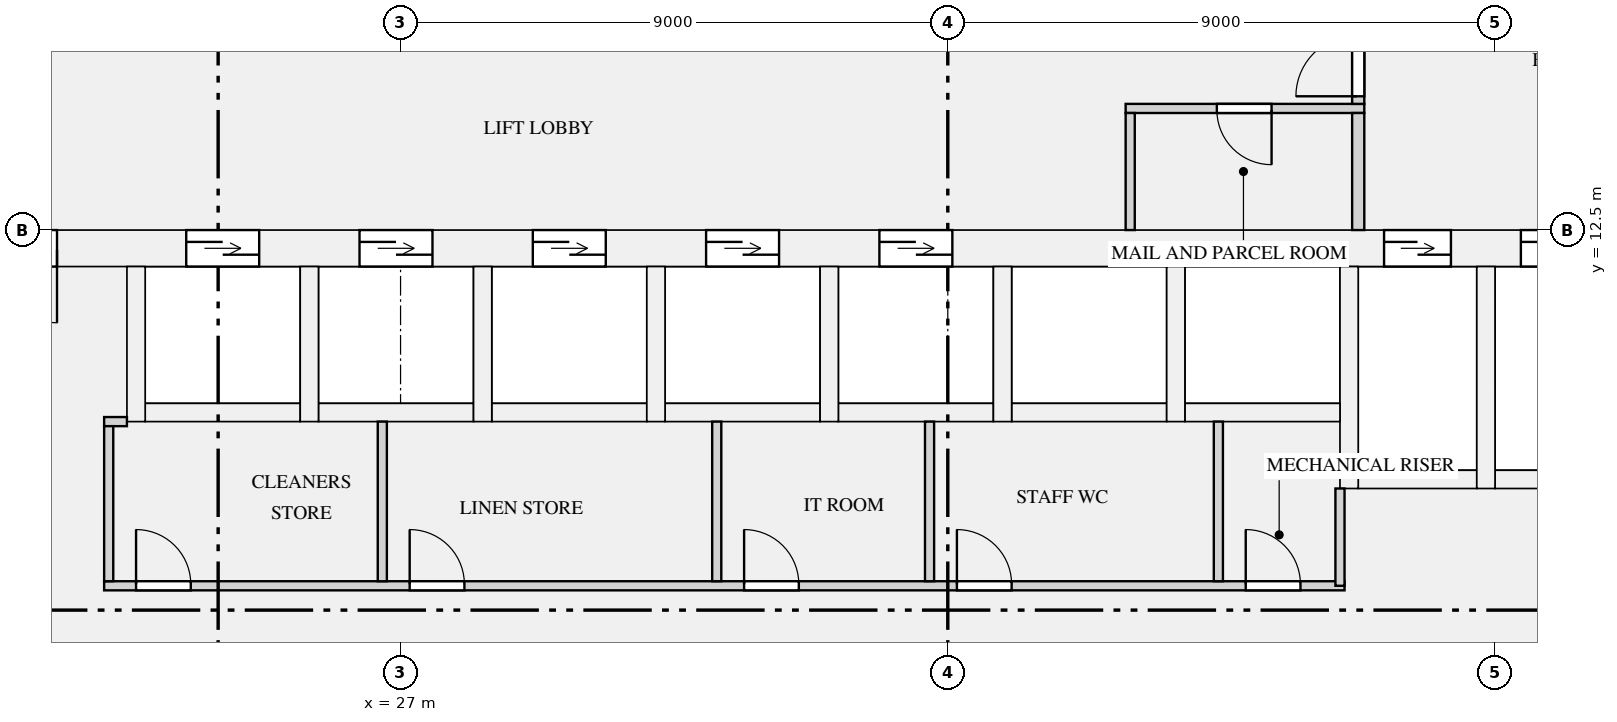
"""IFC4 building model, lengths in metres.
Left out: names, types, materials, properties, quantities, classifications, styles, units other than length and angle.
Written with IfcOpenShell. Run it as: python <this file> out.ifc"""

import sys

from ifc_helpers import new_model, si_unit, direction, frame, frame_2d, origin, place, context, subcontext, project, spatial, rectangle, extrude, element, fill, save


model = new_model("IFC4")
c1 = context("Model", 3, precision=1e-05, world=origin(), true_north=direction((0.0, 1.0)))
c2 = subcontext(c1, "Body", "Model", "MODEL_VIEW")
j1 = project(units=[si_unit("LENGTHUNIT", "METRE"), si_unit("PLANEANGLEUNIT", "RADIAN")], contexts=[c1])
p1 = place(None, origin())
s1 = spatial("IfcSite", under=j1, at=p1, CompositionType="ELEMENT")
p2 = place(p1, origin())
s2 = spatial("IfcBuilding", under=s1, at=p2, CompositionType="ELEMENT")
p3 = place(p2, frame((0.0, 0.0, 47.85)))
s3 = spatial("IfcBuildingStorey", under=s2, at=p3, CompositionType="ELEMENT", Elevation=47.85)
p4 = place(p3, frame((19.0, 12.2, 0.0), z_axis=(0.0, 0.0, 1.0), x_axis=(1.0, 0.0, 0.0)))
e1 = element("IfcWall", 1, at=p4, inside=s3, PredefinedType="SHEAR", context=c2, shape_type="SweptSolid", body=[
    extrude(rectangle(XDim=34.0, YDim=0.6, at=frame_2d((17.0, 0.0))), origin(), (0.0, 0.0, 1.0), 3.15),
])
p5 = place(p4, frame((4.475, 0.0, 0.0)))
e2 = element("IfcOpeningElement", 2, at=p5, cuts=e1, PredefinedType="OPENING", context=c2, shape_type="SweptSolid", body=[
    extrude(rectangle(XDim=1.2, YDim=2.1, at=frame_2d((0.6, 1.05))), frame((0.0, 0.31, 0.0), z_axis=(0.0, -1.0, 0.0), x_axis=(1.0, 0.0, 0.0)), (0.0, 0.0, 1.0), 0.62),
])
p6 = place(p4, frame((7.325, 0.0, 0.0)))
e3 = element("IfcOpeningElement", 3, at=p6, cuts=e1, PredefinedType="OPENING", context=c2, shape_type="SweptSolid", body=[
    extrude(rectangle(XDim=1.2, YDim=2.1, at=frame_2d((0.6, 1.05))), frame((0.0, 0.31, 0.0), z_axis=(0.0, -1.0, 0.0), x_axis=(1.0, 0.0, 0.0)), (0.0, 0.0, 1.0), 0.62),
])
p7 = place(p4, frame((10.175, 0.0, 0.0)))
e4 = element("IfcOpeningElement", 4, at=p7, cuts=e1, PredefinedType="OPENING", context=c2, shape_type="SweptSolid", body=[
    extrude(rectangle(XDim=1.2, YDim=2.1, at=frame_2d((0.6, 1.05))), frame((0.0, 0.31, 0.0), z_axis=(0.0, -1.0, 0.0), x_axis=(1.0, 0.0, 0.0)), (0.0, 0.0, 1.0), 0.62),
])
p8 = place(p4, frame((13.025, 0.0, 0.0)))
e5 = element("IfcOpeningElement", 5, at=p8, cuts=e1, PredefinedType="OPENING", context=c2, shape_type="SweptSolid", body=[
    extrude(rectangle(XDim=1.2, YDim=2.1, at=frame_2d((0.6, 1.05))), frame((0.0, 0.31, 0.0), z_axis=(0.0, -1.0, 0.0), x_axis=(1.0, 0.0, 0.0)), (0.0, 0.0, 1.0), 0.62),
])
p9 = place(p4, frame((15.875, 0.0, 0.0)))
e6 = element("IfcOpeningElement", 6, at=p9, cuts=e1, PredefinedType="OPENING", context=c2, shape_type="SweptSolid", body=[
    extrude(rectangle(XDim=1.2, YDim=2.1, at=frame_2d((0.6, 1.05))), frame((0.0, 0.31, 0.0), z_axis=(0.0, -1.0, 0.0), x_axis=(1.0, 0.0, 0.0)), (0.0, 0.0, 1.0), 0.62),
])
p10 = place(p4, frame((24.175, 0.0, 0.0)))
e7 = element("IfcOpeningElement", 7, at=p10, cuts=e1, PredefinedType="OPENING", context=c2, shape_type="SweptSolid", body=[
    extrude(rectangle(XDim=1.1, YDim=2.1, at=frame_2d((0.55, 1.05))), frame((0.0, 0.31, 0.0), z_axis=(0.0, -1.0, 0.0), x_axis=(1.0, 0.0, 0.0)), (0.0, 0.0, 1.0), 0.62),
])
p11 = place(p4, frame((26.425, 0.0, 0.0)))
e8 = element("IfcOpeningElement", 8, at=p11, cuts=e1, PredefinedType="OPENING", context=c2, shape_type="SweptSolid", body=[
    extrude(rectangle(XDim=1.1, YDim=2.1, at=frame_2d((0.55, 1.05))), frame((0.0, 0.31, 0.0), z_axis=(0.0, -1.0, 0.0), x_axis=(1.0, 0.0, 0.0)), (0.0, 0.0, 1.0), 0.62),
])
p12 = place(p4, frame((28.675, 0.0, 0.0)))
e9 = element("IfcOpeningElement", 9, at=p12, cuts=e1, PredefinedType="OPENING", context=c2, shape_type="SweptSolid", body=[
    extrude(rectangle(XDim=1.1, YDim=2.1, at=frame_2d((0.55, 1.05))), frame((0.0, 0.31, 0.0), z_axis=(0.0, -1.0, 0.0), x_axis=(1.0, 0.0, 0.0)), (0.0, 0.0, 1.0), 0.62),
])
p13 = place(p4, frame((1.15, 0.0, 0.0)))
e10 = element("IfcOpeningElement", 10, at=p13, cuts=e1, PredefinedType="OPENING", context=c2, shape_type="SweptSolid", body=[
    extrude(rectangle(XDim=1.2, YDim=2.1, at=frame_2d((0.6, 1.05))), frame((0.0, 0.31, 0.0), z_axis=(0.0, -1.0, 0.0), x_axis=(1.0, 0.0, 0.0)), (0.0, 0.0, 1.0), 0.62),
])
p14 = place(p4, frame((31.65, 0.0, 0.0)))
e11 = element("IfcOpeningElement", 11, at=p14, cuts=e1, PredefinedType="OPENING", context=c2, shape_type="SweptSolid", body=[
    extrude(rectangle(XDim=1.2, YDim=2.1, at=frame_2d((0.6, 1.05))), frame((0.0, 0.31, 0.0), z_axis=(0.0, -1.0, 0.0), x_axis=(1.0, 0.0, 0.0)), (0.0, 0.0, 1.0), 0.62),
])
p15 = place(p3, frame((22.8, 9.5, 0.0), z_axis=(0.0, 0.0, 1.0), x_axis=(1.0, 0.0, 0.0)))
e12 = element("IfcWall", 12, at=p15, inside=s3, PredefinedType="SHEAR", context=c2, shape_type="SweptSolid", body=[
    extrude(rectangle(XDim=2.55, YDim=0.3, at=frame_2d((1.275, 0.0))), origin(), (0.0, 0.0, 1.0), 3.15),
])
p16 = place(p3, frame((22.65, 9.35, 0.0), z_axis=(0.0, 0.0, 1.0), x_axis=(0.0, 1.0, 0.0)))
e13 = element("IfcWall", 13, at=p16, inside=s3, PredefinedType="SHEAR", context=c2, shape_type="SweptSolid", body=[
    extrude(rectangle(XDim=2.55, YDim=0.3, at=frame_2d((1.275, 0.0))), origin(), (0.0, 0.0, 1.0), 3.15),
])
p17 = place(p3, frame((25.65, 9.5, 0.0), z_axis=(0.0, 0.0, 1.0), x_axis=(1.0, 0.0, 0.0)))
e14 = element("IfcWall", 14, at=p17, inside=s3, PredefinedType="SHEAR", context=c2, shape_type="SweptSolid", body=[
    extrude(rectangle(XDim=2.55, YDim=0.3, at=frame_2d((1.275, 0.0))), origin(), (0.0, 0.0, 1.0), 3.15),
])
p18 = place(p3, frame((25.5, 9.35, 0.0), z_axis=(0.0, 0.0, 1.0), x_axis=(0.0, 1.0, 0.0)))
e15 = element("IfcWall", 15, at=p18, inside=s3, PredefinedType="SHEAR", context=c2, shape_type="SweptSolid", body=[
    extrude(rectangle(XDim=2.55, YDim=0.3, at=frame_2d((1.275, 0.0))), origin(), (0.0, 0.0, 1.0), 3.15),
])
p19 = place(p3, frame((28.5, 9.5, 0.0), z_axis=(0.0, 0.0, 1.0), x_axis=(1.0, 0.0, 0.0)))
e16 = element("IfcWall", 16, at=p19, inside=s3, PredefinedType="SHEAR", context=c2, shape_type="SweptSolid", body=[
    extrude(rectangle(XDim=2.55, YDim=0.3, at=frame_2d((1.275, 0.0))), origin(), (0.0, 0.0, 1.0), 3.15),
])
for number, where, z_axis, x_axis in (
    (17, (28.35, 9.35, 0.0), (0.0, 0.0, 1.0), (0.0, 1.0, 0.0)),
    (18, (31.35, 9.5, 0.0), (0.0, 0.0, 1.0), (1.0, 0.0, 0.0)),
    (19, (31.2, 9.35, 0.0), (0.0, 0.0, 1.0), (0.0, 1.0, 0.0)),
):
    element("IfcWall", number, at=place(p3, frame(where, z_axis=z_axis, x_axis=x_axis)), inside=s3, PredefinedType="SHEAR", context=c2, shape_type="SweptSolid", body=[
        extrude(rectangle(XDim=2.55, YDim=0.3, at=frame_2d((1.275, 0.0))), origin(), (0.0, 0.0, 1.0), 3.15),
    ])
p20 = place(p3, frame((34.2, 9.5, 0.0), z_axis=(0.0, 0.0, 1.0), x_axis=(1.0, 0.0, 0.0)))
e20 = element("IfcWall", 20, at=p20, inside=s3, PredefinedType="SHEAR", context=c2, shape_type="SweptSolid", body=[
    extrude(rectangle(XDim=2.55, YDim=0.3, at=frame_2d((1.275, 0.0))), origin(), (0.0, 0.0, 1.0), 3.15),
])
p21 = place(p3, frame((34.05, 9.35, 0.0), z_axis=(0.0, 0.0, 1.0), x_axis=(0.0, 1.0, 0.0)))
e21 = element("IfcWall", 21, at=p21, inside=s3, PredefinedType="SHEAR", context=c2, shape_type="SweptSolid", body=[
    extrude(rectangle(XDim=2.55, YDim=0.3, at=frame_2d((1.275, 0.0))), origin(), (0.0, 0.0, 1.0), 3.15),
])
p22 = place(p3, frame((37.05, 9.5, 0.0), z_axis=(0.0, 0.0, 1.0), x_axis=(1.0, 0.0, 0.0)))
e22 = element("IfcWall", 22, at=p22, inside=s3, PredefinedType="SHEAR", context=c2, shape_type="SweptSolid", body=[
    extrude(rectangle(XDim=2.55, YDim=0.3, at=frame_2d((1.275, 0.0))), origin(), (0.0, 0.0, 1.0), 3.15),
])
p23 = place(p3, frame((36.9, 9.35, 0.0), z_axis=(0.0, 0.0, 1.0), x_axis=(0.0, 1.0, 0.0)))
e23 = element("IfcWall", 23, at=p23, inside=s3, PredefinedType="SHEAR", context=c2, shape_type="SweptSolid", body=[
    extrude(rectangle(XDim=2.55, YDim=0.3, at=frame_2d((1.275, 0.0))), origin(), (0.0, 0.0, 1.0), 3.15),
])
p24 = place(p3, frame((39.9, 9.5, 0.0), z_axis=(0.0, 0.0, 1.0), x_axis=(1.0, 0.0, 0.0)))
e24 = element("IfcWall", 24, at=p24, inside=s3, PredefinedType="SHEAR", context=c2, shape_type="SweptSolid", body=[
    extrude(rectangle(XDim=2.55, YDim=0.3, at=frame_2d((1.275, 0.0))), origin(), (0.0, 0.0, 1.0), 3.15),
])
p25 = place(p3, frame((39.75, 9.35, 0.0), z_axis=(0.0, 0.0, 1.0), x_axis=(0.0, 1.0, 0.0)))
e25 = element("IfcWall", 25, at=p25, inside=s3, PredefinedType="SHEAR", context=c2, shape_type="SweptSolid", body=[
    extrude(rectangle(XDim=2.55, YDim=0.3, at=frame_2d((1.275, 0.0))), origin(), (0.0, 0.0, 1.0), 3.15),
])
p26 = place(p3, frame((42.75, 8.4, 0.0), z_axis=(0.0, 0.0, 1.0), x_axis=(1.0, 0.0, 0.0)))
e26 = element("IfcWall", 26, at=p26, inside=s3, PredefinedType="SHEAR", context=c2, shape_type="SweptSolid", body=[
    extrude(rectangle(XDim=1.95, YDim=0.3, at=frame_2d((0.975, 0.0))), origin(), (0.0, 0.0, 1.0), 3.15),
])
p27 = place(p3, frame((42.6, 8.25, 0.0), z_axis=(0.0, 0.0, 1.0), x_axis=(0.0, 1.0, 0.0)))
e27 = element("IfcWall", 27, at=p27, inside=s3, PredefinedType="SHEAR", context=c2, shape_type="SweptSolid", body=[
    extrude(rectangle(XDim=3.65, YDim=0.3, at=frame_2d((1.825, 0.0))), origin(), (0.0, 0.0, 1.0), 3.15),
])
p28 = place(p3, frame((45.0, 8.4, 0.0), z_axis=(0.0, 0.0, 1.0), x_axis=(1.0, 0.0, 0.0)))
e28 = element("IfcWall", 28, at=p28, inside=s3, PredefinedType="SHEAR", context=c2, shape_type="SweptSolid", body=[
    extrude(rectangle(XDim=1.95, YDim=0.3, at=frame_2d((0.975, 0.0))), origin(), (0.0, 0.0, 1.0), 3.15),
])
p29 = place(p3, frame((44.85, 8.25, 0.0), z_axis=(0.0, 0.0, 1.0), x_axis=(0.0, 1.0, 0.0)))
e29 = element("IfcWall", 29, at=p29, inside=s3, PredefinedType="SHEAR", context=c2, shape_type="SweptSolid", body=[
    extrude(rectangle(XDim=3.65, YDim=0.3, at=frame_2d((1.825, 0.0))), origin(), (0.0, 0.0, 1.0), 3.15),
])
p30 = place(p3, frame((22.125, 6.65, 0.0), z_axis=(0.0, 0.0, 1.0), x_axis=(1.0, 0.0, 0.0)))
e30 = element("IfcWall", 30, at=p30, inside=s3, PredefinedType="PARTITIONING", context=c2, shape_type="SweptSolid", body=[
    extrude(rectangle(XDim=20.4, YDim=0.15, at=frame_2d((10.2, 0.0))), origin(), (0.0, 0.0, 1.0), 2.83),
])
p31 = place(p30, frame((0.525, 0.0, 0.0)))
e31 = element("IfcOpeningElement", 31, at=p31, cuts=e30, PredefinedType="OPENING", context=c2, shape_type="SweptSolid", body=[
    extrude(rectangle(XDim=0.9, YDim=2.1, at=frame_2d((0.45, 1.05))), frame((0.0, 0.085, 0.0), z_axis=(0.0, -1.0, 0.0), x_axis=(1.0, 0.0, 0.0)), (0.0, 0.0, 1.0), 0.17),
])
p32 = place(p30, frame((5.025, 0.0, 0.0)))
e32 = element("IfcOpeningElement", 32, at=p32, cuts=e30, PredefinedType="OPENING", context=c2, shape_type="SweptSolid", body=[
    extrude(rectangle(XDim=0.9, YDim=2.1, at=frame_2d((0.45, 1.05))), frame((0.0, 0.085, 0.0), z_axis=(0.0, -1.0, 0.0), x_axis=(1.0, 0.0, 0.0)), (0.0, 0.0, 1.0), 0.17),
])
p33 = place(p30, frame((10.525, 0.0, 0.0)))
e33 = element("IfcOpeningElement", 33, at=p33, cuts=e30, PredefinedType="OPENING", context=c2, shape_type="SweptSolid", body=[
    extrude(rectangle(XDim=0.9, YDim=2.1, at=frame_2d((0.45, 1.05))), frame((0.0, 0.085, 0.0), z_axis=(0.0, -1.0, 0.0), x_axis=(1.0, 0.0, 0.0)), (0.0, 0.0, 1.0), 0.17),
])
p34 = place(p30, frame((14.025, 0.0, 0.0)))
e34 = element("IfcOpeningElement", 34, at=p34, cuts=e30, PredefinedType="OPENING", context=c2, shape_type="SweptSolid", body=[
    extrude(rectangle(XDim=0.9, YDim=2.1, at=frame_2d((0.45, 1.05))), frame((0.0, 0.085, 0.0), z_axis=(0.0, -1.0, 0.0), x_axis=(1.0, 0.0, 0.0)), (0.0, 0.0, 1.0), 0.17),
])
p35 = place(p30, frame((18.775, 0.0, 0.0)))
e35 = element("IfcOpeningElement", 35, at=p35, cuts=e30, PredefinedType="OPENING", context=c2, shape_type="SweptSolid", body=[
    extrude(rectangle(XDim=0.9, YDim=2.1, at=frame_2d((0.45, 1.05))), frame((0.0, 0.085, 0.0), z_axis=(0.0, -1.0, 0.0), x_axis=(1.0, 0.0, 0.0)), (0.0, 0.0, 1.0), 0.17),
])
p36 = place(p3, frame((22.125, 9.35, 0.0), z_axis=(0.0, 0.0, 1.0), x_axis=(1.0, 0.0, 0.0)))
e36 = element("IfcWall", 36, at=p36, inside=s3, PredefinedType="PARTITIONING", context=c2, shape_type="SweptSolid", body=[
    extrude(rectangle(XDim=0.375, YDim=0.15, at=frame_2d((0.188, 0.0))), origin(), (0.0, 0.0, 1.0), 2.83),
])
p37 = place(p3, frame((38.925, 14.5, 0.0), z_axis=(0.0, 0.0, 1.0), x_axis=(1.0, 0.0, 0.0)))
e37 = element("IfcWall", 37, at=p37, inside=s3, PredefinedType="PARTITIONING", context=c2, shape_type="SweptSolid", body=[
    extrude(rectangle(XDim=3.925, YDim=0.15, at=frame_2d((1.962, 0.0))), origin(), (0.0, 0.0, 1.0), 2.83),
])
p38 = place(p37, frame((1.5, 0.0, 0.0)))
e38 = element("IfcOpeningElement", 38, at=p38, cuts=e37, PredefinedType="OPENING", context=c2, shape_type="SweptSolid", body=[
    extrude(rectangle(XDim=0.9, YDim=2.1, at=frame_2d((0.45, 1.05))), frame((0.0, 0.085, 0.0), z_axis=(0.0, -1.0, 0.0), x_axis=(1.0, 0.0, 0.0)), (0.0, 0.0, 1.0), 0.17),
])
p39 = place(p3, frame((42.45, 6.65, 0.0), z_axis=(0.0, 0.0, 1.0), x_axis=(0.0, 1.0, 0.0)))
e39 = element("IfcWall", 39, at=p39, inside=s3, PredefinedType="PARTITIONING", context=c2, shape_type="SweptSolid", body=[
    extrude(rectangle(XDim=1.6, YDim=0.15, at=frame_2d((0.8, 0.0))), origin(), (0.0, 0.0, 1.0), 2.83),
])
p40 = place(p3, frame((22.2, 6.725, 0.0), z_axis=(0.0, 0.0, 1.0), x_axis=(0.0, 1.0, 0.0)))
e40 = element("IfcWall", 40, at=p40, inside=s3, PredefinedType="PARTITIONING", context=c2, shape_type="SweptSolid", body=[
    extrude(rectangle(XDim=2.55, YDim=0.15, at=frame_2d((1.275, 0.0))), origin(), (0.0, 0.0, 1.0), 2.83),
])
for number, where, z_axis, x_axis in (
    (41, (26.7, 6.725, 0.0), (0.0, 0.0, 1.0), (0.0, 1.0, 0.0)),
    (42, (32.2, 6.725, 0.0), (0.0, 0.0, 1.0), (0.0, 1.0, 0.0)),
    (43, (35.7, 6.725, 0.0), (0.0, 0.0, 1.0), (0.0, 1.0, 0.0)),
    (44, (40.45, 6.725, 0.0), (0.0, 0.0, 1.0), (0.0, 1.0, 0.0)),
):
    element("IfcWall", number, at=place(p3, frame(where, z_axis=z_axis, x_axis=x_axis)), inside=s3, PredefinedType="PARTITIONING", context=c2, shape_type="SweptSolid", body=[
        extrude(rectangle(XDim=2.625, YDim=0.15, at=frame_2d((1.312, 0.0))), origin(), (0.0, 0.0, 1.0), 2.83),
    ])
p41 = place(p3, frame((39.0, 12.5, 0.0), z_axis=(0.0, 0.0, 1.0), x_axis=(0.0, 1.0, 0.0)))
e45 = element("IfcWall", 45, at=p41, inside=s3, PredefinedType="PARTITIONING", context=c2, shape_type="SweptSolid", body=[
    extrude(rectangle(XDim=1.925, YDim=0.15, at=frame_2d((0.962, 0.0))), origin(), (0.0, 0.0, 1.0), 2.83),
])
p42 = place(p3, frame((42.75, 12.5, 0.0), z_axis=(0.0, 0.0, 1.0), x_axis=(0.0, 1.0, 0.0)))
e46 = element("IfcWall", 46, at=p42, inside=s3, PredefinedType="PARTITIONING", context=c2, shape_type="SweptSolid", body=[
    extrude(rectangle(XDim=1.925, YDim=0.2, at=frame_2d((0.962, 0.0))), origin(), (0.0, 0.0, 1.0), 2.83),
])
p43 = place(p3, frame((42.75, 14.575, 0.0), z_axis=(0.0, 0.0, 1.0), x_axis=(0.0, 1.0, 0.0)))
e47 = element("IfcWall", 47, at=p43, inside=s3, PredefinedType="PARTITIONING", context=c2, shape_type="SweptSolid", body=[
    extrude(rectangle(XDim=1.325, YDim=0.2, at=frame_2d((0.663, 0.0))), origin(), (0.0, 0.0, 1.0), 2.83),
])
p44 = place(p43, frame((0.125, 0.0, 0.0)))
e48 = element("IfcOpeningElement", 48, at=p44, cuts=e47, PredefinedType="OPENING", context=c2, shape_type="SweptSolid", body=[
    extrude(rectangle(XDim=1.0, YDim=2.1, at=frame_2d((0.5, 1.05))), frame((0.0, 0.11, 0.0), z_axis=(0.0, -1.0, 0.0), x_axis=(1.0, 0.0, 0.0)), (0.0, 0.0, 1.0), 0.22),
])
p45 = place(p5, origin())
e49 = element("IfcDoor", 49, at=p45, inside=s3, OperationType="DOUBLE_DOOR_SLIDING", PredefinedType="DOOR", context=c2, shape_type="SweptSolid", body=[
    extrude(rectangle(XDim=1.2, YDim=2.1, at=frame_2d((0.6, 1.05))), frame((0.0, 0.025, 0.0), z_axis=(0.0, -1.0, 0.0), x_axis=(1.0, 0.0, 0.0)), (0.0, 0.0, 1.0), 0.05),
])
fill(e2, e49)
p46 = place(p6, origin())
e50 = element("IfcDoor", 50, at=p46, inside=s3, OperationType="DOUBLE_DOOR_SLIDING", PredefinedType="DOOR", context=c2, shape_type="SweptSolid", body=[
    extrude(rectangle(XDim=1.2, YDim=2.1, at=frame_2d((0.6, 1.05))), frame((0.0, 0.025, 0.0), z_axis=(0.0, -1.0, 0.0), x_axis=(1.0, 0.0, 0.0)), (0.0, 0.0, 1.0), 0.05),
])
fill(e3, e50)
p47 = place(p7, origin())
e51 = element("IfcDoor", 51, at=p47, inside=s3, OperationType="DOUBLE_DOOR_SLIDING", PredefinedType="DOOR", context=c2, shape_type="SweptSolid", body=[
    extrude(rectangle(XDim=1.2, YDim=2.1, at=frame_2d((0.6, 1.05))), frame((0.0, 0.025, 0.0), z_axis=(0.0, -1.0, 0.0), x_axis=(1.0, 0.0, 0.0)), (0.0, 0.0, 1.0), 0.05),
])
fill(e4, e51)
p48 = place(p8, origin())
e52 = element("IfcDoor", 52, at=p48, inside=s3, OperationType="DOUBLE_DOOR_SLIDING", PredefinedType="DOOR", context=c2, shape_type="SweptSolid", body=[
    extrude(rectangle(XDim=1.2, YDim=2.1, at=frame_2d((0.6, 1.05))), frame((0.0, 0.025, 0.0), z_axis=(0.0, -1.0, 0.0), x_axis=(1.0, 0.0, 0.0)), (0.0, 0.0, 1.0), 0.05),
])
fill(e5, e52)
p49 = place(p9, origin())
e53 = element("IfcDoor", 53, at=p49, inside=s3, OperationType="DOUBLE_DOOR_SLIDING", PredefinedType="DOOR", context=c2, shape_type="SweptSolid", body=[
    extrude(rectangle(XDim=1.2, YDim=2.1, at=frame_2d((0.6, 1.05))), frame((0.0, 0.025, 0.0), z_axis=(0.0, -1.0, 0.0), x_axis=(1.0, 0.0, 0.0)), (0.0, 0.0, 1.0), 0.05),
])
fill(e6, e53)
p50 = place(p10, origin())
e54 = element("IfcDoor", 54, at=p50, inside=s3, OperationType="DOUBLE_DOOR_SLIDING", PredefinedType="DOOR", context=c2, shape_type="SweptSolid", body=[
    extrude(rectangle(XDim=1.1, YDim=2.1, at=frame_2d((0.55, 1.05))), frame((0.0, 0.025, 0.0), z_axis=(0.0, -1.0, 0.0), x_axis=(1.0, 0.0, 0.0)), (0.0, 0.0, 1.0), 0.05),
])
fill(e7, e54)
p51 = place(p11, origin())
e55 = element("IfcDoor", 55, at=p51, inside=s3, OperationType="DOUBLE_DOOR_SLIDING", PredefinedType="DOOR", context=c2, shape_type="SweptSolid", body=[
    extrude(rectangle(XDim=1.1, YDim=2.1, at=frame_2d((0.55, 1.05))), frame((0.0, 0.025, 0.0), z_axis=(0.0, -1.0, 0.0), x_axis=(1.0, 0.0, 0.0)), (0.0, 0.0, 1.0), 0.05),
])
fill(e8, e55)
p52 = place(p31, origin())
e56 = element("IfcDoor", 56, at=p52, inside=s3, OperationType="SINGLE_SWING_LEFT", PredefinedType="DOOR", context=c2, shape_type="SweptSolid", body=[
    extrude(rectangle(XDim=0.9, YDim=2.1, at=frame_2d((0.45, 1.05))), frame((0.0, 0.025, 0.0), z_axis=(0.0, -1.0, 0.0), x_axis=(1.0, 0.0, 0.0)), (0.0, 0.0, 1.0), 0.05),
])
fill(e31, e56)
p53 = place(p32, origin())
e57 = element("IfcDoor", 57, at=p53, inside=s3, OperationType="SINGLE_SWING_LEFT", PredefinedType="DOOR", context=c2, shape_type="SweptSolid", body=[
    extrude(rectangle(XDim=0.9, YDim=2.1, at=frame_2d((0.45, 1.05))), frame((0.0, 0.025, 0.0), z_axis=(0.0, -1.0, 0.0), x_axis=(1.0, 0.0, 0.0)), (0.0, 0.0, 1.0), 0.05),
])
fill(e32, e57)
p54 = place(p33, origin())
e58 = element("IfcDoor", 58, at=p54, inside=s3, OperationType="SINGLE_SWING_LEFT", PredefinedType="DOOR", context=c2, shape_type="SweptSolid", body=[
    extrude(rectangle(XDim=0.9, YDim=2.1, at=frame_2d((0.45, 1.05))), frame((0.0, 0.025, 0.0), z_axis=(0.0, -1.0, 0.0), x_axis=(1.0, 0.0, 0.0)), (0.0, 0.0, 1.0), 0.05),
])
fill(e33, e58)
p55 = place(p34, origin())
e59 = element("IfcDoor", 59, at=p55, inside=s3, OperationType="SINGLE_SWING_LEFT", PredefinedType="DOOR", context=c2, shape_type="SweptSolid", body=[
    extrude(rectangle(XDim=0.9, YDim=2.1, at=frame_2d((0.45, 1.05))), frame((0.0, 0.025, 0.0), z_axis=(0.0, -1.0, 0.0), x_axis=(1.0, 0.0, 0.0)), (0.0, 0.0, 1.0), 0.05),
])
fill(e34, e59)
p56 = place(p35, origin())
e60 = element("IfcDoor", 60, at=p56, inside=s3, OperationType="SINGLE_SWING_LEFT", PredefinedType="DOOR", context=c2, shape_type="SweptSolid", body=[
    extrude(rectangle(XDim=0.9, YDim=2.1, at=frame_2d((0.45, 1.05))), frame((0.0, 0.025, 0.0), z_axis=(0.0, -1.0, 0.0), x_axis=(1.0, 0.0, 0.0)), (0.0, 0.0, 1.0), 0.05),
])
fill(e35, e60)
p57 = place(p38, frame((0.9, 0.0, 0.0), z_axis=(0.0, 0.0, 1.0), x_axis=(-1.0, 0.0, 0.0)))
e61 = element("IfcDoor", 61, at=p57, inside=s3, OperationType="SINGLE_SWING_LEFT", PredefinedType="DOOR", context=c2, shape_type="SweptSolid", body=[
    extrude(rectangle(XDim=0.9, YDim=2.1, at=frame_2d((0.45, 1.05))), frame((0.0, 0.025, 0.0), z_axis=(0.0, -1.0, 0.0), x_axis=(1.0, 0.0, 0.0)), (0.0, 0.0, 1.0), 0.05),
])
fill(e38, e61)
p58 = place(p13, frame((1.2, 0.0, 0.0), z_axis=(0.0, 0.0, 1.0), x_axis=(-1.0, 0.0, 0.0)))
e62 = element("IfcDoor", 62, at=p58, inside=s3, OperationType="SINGLE_SWING_LEFT", PredefinedType="DOOR", context=c2, shape_type="SweptSolid", body=[
    extrude(rectangle(XDim=1.2, YDim=2.1, at=frame_2d((0.6, 1.05))), frame((0.0, 0.025, 0.0), z_axis=(0.0, -1.0, 0.0), x_axis=(1.0, 0.0, 0.0)), (0.0, 0.0, 1.0), 0.05),
])
fill(e10, e62)
p59 = place(p44, origin())
e63 = element("IfcDoor", 63, at=p59, inside=s3, OperationType="SINGLE_SWING_LEFT", PredefinedType="DOOR", context=c2, shape_type="SweptSolid", body=[
    extrude(rectangle(XDim=1.0, YDim=2.1, at=frame_2d((0.5, 1.05))), frame((0.0, 0.025, 0.0), z_axis=(0.0, -1.0, 0.0), x_axis=(1.0, 0.0, 0.0)), (0.0, 0.0, 1.0), 0.05),
])
fill(e48, e63)
save(model, sys.argv[1])
